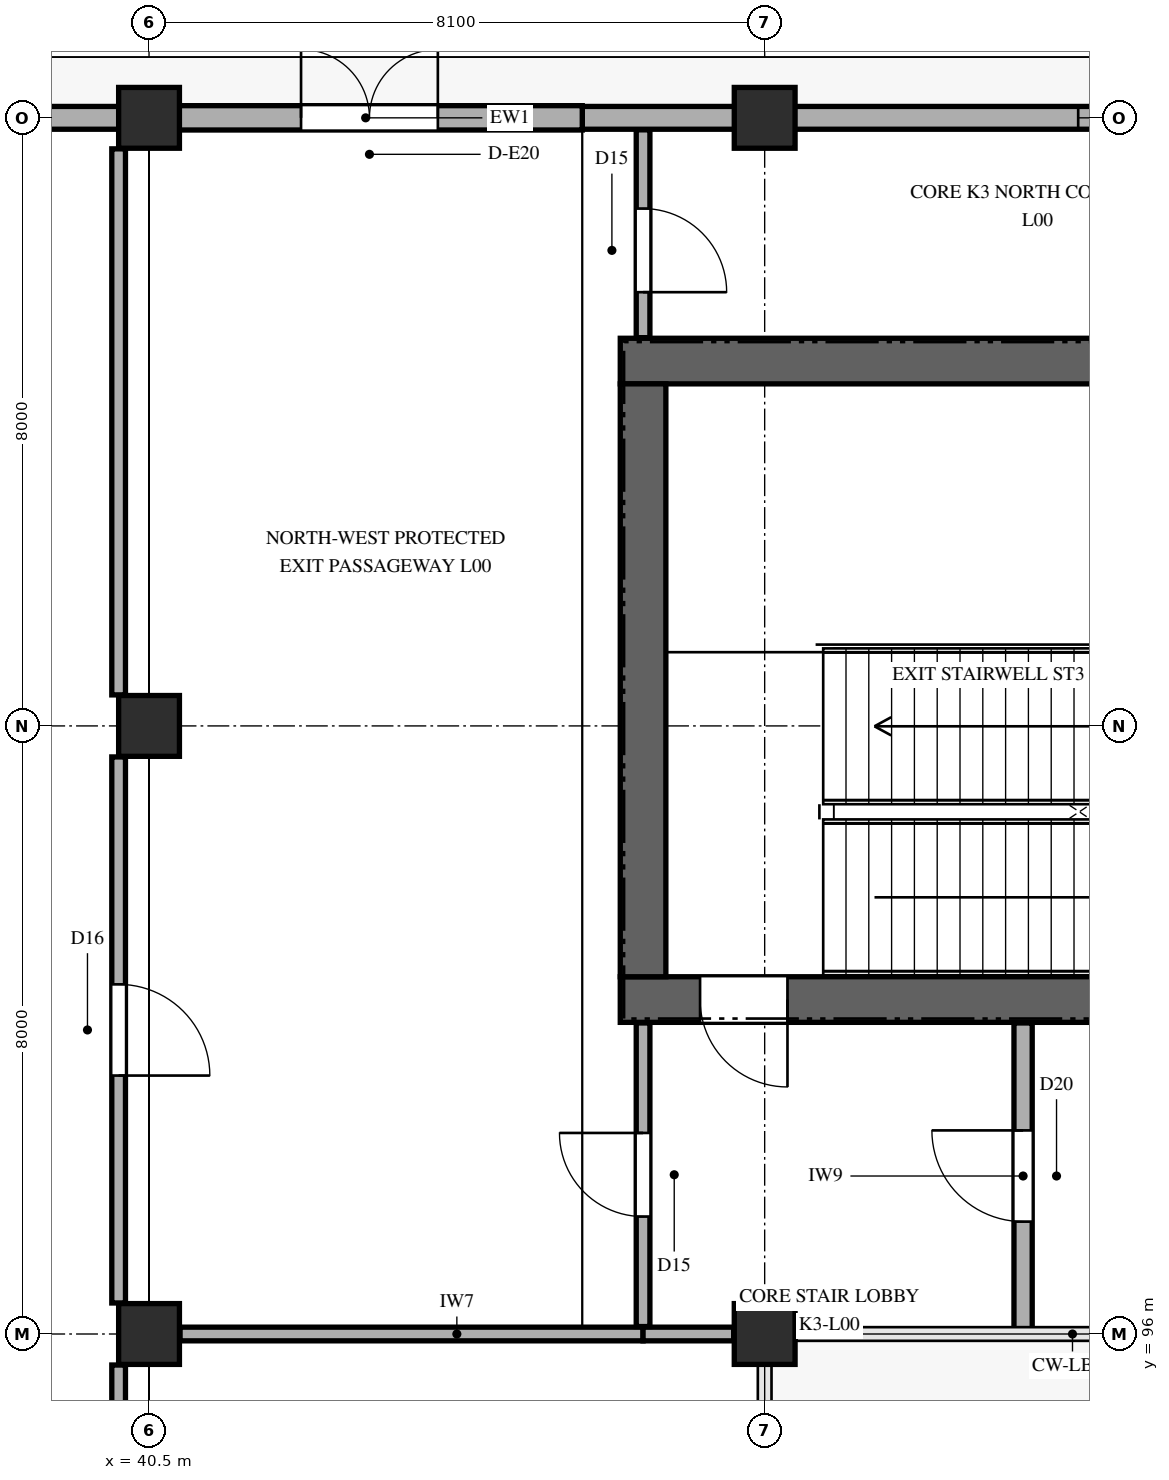
"""IFC4 building model, lengths in metres.
Left out: names, types, materials, properties, quantities, classifications, styles, units other than length and angle.
Written with IfcOpenShell. Run it as: python <this file> out.ifc"""

import sys

from ifc_helpers import new_model, si_unit, direction, frame, frame_2d, origin, origin_2d, place, context, subcontext, project, spatial, rectangle, extrude, element, fill, save


model = new_model("IFC4")
c1 = context("Model", 3, precision=1e-05, world=origin(), true_north=direction((0.0, 1.0)))
c2 = subcontext(c1, "Body", "Model", "MODEL_VIEW")
j1 = project(units=[si_unit("LENGTHUNIT", "METRE"), si_unit("PLANEANGLEUNIT", "RADIAN")], contexts=[c1])
p1 = place(None, origin())
s1 = spatial("IfcSite", under=j1, at=p1, CompositionType="ELEMENT")
p2 = place(p1, origin())
s2 = spatial("IfcBuilding", under=s1, at=p2, CompositionType="ELEMENT")
p3 = place(p2, origin())
s3 = spatial("IfcBuildingStorey", under=s2, at=p3, CompositionType="ELEMENT", Elevation=0.0)
p4 = place(p3, frame((46.7, 100.4, 0.0), z_axis=(0.0, 0.0, 1.0), x_axis=(1.0, 0.0, 0.0)))
e1 = element("IfcWall", 1, at=p4, inside=s3, PredefinedType="SHEAR", context=c2, shape_type="SweptSolid", body=[
    extrude(rectangle(XDim=15.4, YDim=0.6, at=frame_2d((7.7, 0.0))), origin(), (0.0, 0.0, 1.0), 5.4),
])
p5 = place(p4, frame((1.05, 0.0, 0.0)))
e2 = element("IfcOpeningElement", 2, at=p5, cuts=e1, PredefinedType="OPENING", context=c2, shape_type="SweptSolid", body=[
    extrude(rectangle(XDim=1.15, YDim=2.25, at=frame_2d((0.575, 1.125))), frame((0.0, 0.31, 0.0), z_axis=(0.0, -1.0, 0.0), x_axis=(1.0, 0.0, 0.0)), (0.0, 0.0, 1.0), 0.62),
])
p6 = place(p4, frame((10.333, 0.0, 0.0)))
e3 = element("IfcOpeningElement", 3, at=p6, cuts=e1, PredefinedType="OPENING", context=c2, shape_type="SweptSolid", body=[
    extrude(rectangle(XDim=1.1, YDim=2.2, at=frame_2d((0.55, 1.1))), frame((0.0, 0.31, 0.0), z_axis=(0.0, -1.0, 0.0), x_axis=(1.0, 0.0, 0.0)), (0.0, 0.0, 1.0), 0.62),
])
p7 = place(p4, frame((13.048, 0.0, 0.0)))
e4 = element("IfcOpeningElement", 4, at=p7, cuts=e1, PredefinedType="OPENING", context=c2, shape_type="SweptSolid", body=[
    extrude(rectangle(XDim=1.1, YDim=2.2, at=frame_2d((0.55, 1.1))), frame((0.0, 0.31, 0.0), z_axis=(0.0, -1.0, 0.0), x_axis=(1.0, 0.0, 0.0)), (0.0, 0.0, 1.0), 0.62),
])
p8 = place(p3, frame((46.7, 108.8, 0.0), z_axis=(0.0, 0.0, 1.0), x_axis=(1.0, 0.0, 0.0)))
e5 = element("IfcWall", 5, at=p8, inside=s3, PredefinedType="SHEAR", context=c2, shape_type="SweptSolid", body=[
    extrude(rectangle(XDim=15.4, YDim=0.6, at=frame_2d((7.7, 0.0))), origin(), (0.0, 0.0, 1.0), 5.4),
])
p9 = place(p3, frame((47.0, 100.7, 0.0), z_axis=(0.0, 0.0, 1.0), x_axis=(0.0, 1.0, 0.0)))
e6 = element("IfcWall", 6, at=p9, inside=s3, PredefinedType="SHEAR", context=c2, shape_type="SweptSolid", body=[
    extrude(rectangle(XDim=7.8, YDim=0.6, at=frame_2d((3.9, 0.0))), origin(), (0.0, 0.0, 1.0), 5.4),
])
for number, where, z_axis, x_axis in (
    (7, (40.5, 96.0, 0.0), (0.0, 0.0, 1.0), (1.0, 0.0, 0.0)),
    (8, (40.5, 104.0, 0.0), (0.0, 0.0, 1.0), (1.0, 0.0, 0.0)),
    (9, (40.5, 112.0, 0.0), (0.0, 0.0, 1.0), (1.0, 0.0, 0.0)),
    (10, (48.6, 96.0, 0.0), (0.0, 0.0, 1.0), (1.0, 0.0, 0.0)),
    (11, (48.6, 112.0, 0.0), (0.0, 0.0, 1.0), (1.0, 0.0, 0.0)),
):
    element("IfcColumn", number, at=place(p3, frame(where, z_axis=z_axis, x_axis=x_axis)), inside=s3, PredefinedType="COLUMN", context=c2, shape_type="SweptSolid", body=[
        extrude(rectangle(XDim=0.8, YDim=0.8, at=origin_2d()), origin(), (0.0, 0.0, 1.0), 5.4),
    ])
p10 = place(p3, frame((62.775, 112.0, 0.0), z_axis=(0.0, 0.0, 1.0), x_axis=(-1.0, 0.0, 0.0)))
e12 = element("IfcWall", 12, at=p10, inside=s3, PredefinedType="SOLIDWALL", context=c2, shape_type="SweptSolid", body=[
    extrude(rectangle(XDim=14.175, YDim=0.3, at=frame_2d((7.087, 0.0))), origin(), (0.0, 0.0, 1.0), 4.412),
])
p11 = place(p10, frame((8.55, 0.0, 0.95)))
e13 = element("IfcOpeningElement", 13, at=p11, cuts=e12, PredefinedType="OPENING", context=c2, shape_type="SweptSolid", body=[
    extrude(rectangle(XDim=1.5, YDim=1.8, at=frame_2d((0.75, 0.9))), frame((0.0, 0.16, 0.0), z_axis=(0.0, -1.0, 0.0), x_axis=(1.0, 0.0, 0.0)), (0.0, 0.0, 1.0), 0.32),
])
p12 = place(p3, frame((48.6, 112.0, 0.0), z_axis=(0.0, 0.0, 1.0), x_axis=(-1.0, 0.0, 0.0)))
e14 = element("IfcWall", 14, at=p12, inside=s3, PredefinedType="SOLIDWALL", context=c2, shape_type="SweptSolid", body=[
    extrude(rectangle(XDim=2.4, YDim=0.3, at=frame_2d((1.2, 0.0))), origin(), (0.0, 0.0, 1.0), 4.412),
])
p13 = place(p3, frame((46.2, 112.0, 0.0), z_axis=(0.0, 0.0, 1.0), x_axis=(-1.0, 0.0, 0.0)))
e15 = element("IfcWall", 15, at=p13, inside=s3, PredefinedType="SOLIDWALL", context=c2, shape_type="SweptSolid", body=[
    extrude(rectangle(XDim=5.7, YDim=0.32, at=frame_2d((2.85, 0.0))), origin(), (0.0, 0.0, 1.0), 4.412),
])
p14 = place(p13, frame((1.9, 0.0, 0.0)))
e16 = element("IfcOpeningElement", 16, at=p14, cuts=e15, PredefinedType="OPENING", context=c2, shape_type="SweptSolid", body=[
    extrude(rectangle(XDim=1.8, YDim=2.4, at=frame_2d((0.9, 1.2))), frame((0.0, 0.17, 0.0), z_axis=(0.0, -1.0, 0.0), x_axis=(1.0, 0.0, 0.0)), (0.0, 0.0, 1.0), 0.34),
])
p15 = place(p3, frame((40.5, 112.0, 0.0), z_axis=(0.0, 0.0, 1.0), x_axis=(-1.0, 0.0, 0.0)))
e17 = element("IfcWall", 17, at=p15, inside=s3, PredefinedType="SOLIDWALL", context=c2, shape_type="SweptSolid", body=[
    extrude(rectangle(XDim=12.15, YDim=0.3, at=frame_2d((6.075, 0.0))), origin(), (0.0, 0.0, 1.0), 4.412),
])
p16 = place(p3, frame((40.908, 96.0, 0.0), z_axis=(0.0, 0.0, 1.0), x_axis=(1.0, 0.0, 0.0)))
e18 = element("IfcWall", 18, at=p16, inside=s3, PredefinedType="PARTITIONING", context=c2, shape_type="SweptSolid", body=[
    extrude(rectangle(XDim=6.092, YDim=0.18, at=frame_2d((3.046, 0.0))), origin(), (0.0, 0.0, 1.0), 4.412),
])
p17 = place(p3, frame((47.0, 96.0, 0.0), z_axis=(0.0, 0.0, 1.0), x_axis=(1.0, 0.0, 0.0)))
e19 = element("IfcWall", 19, at=p17, inside=s3, PredefinedType="PARTITIONING", context=c2, shape_type="SweptSolid", body=[
    extrude(rectangle(XDim=1.192, YDim=0.18, at=frame_2d((0.596, 0.0))), origin(), (0.0, 0.0, 1.0), 4.412),
])
p18 = place(p3, frame((40.1, 88.408, 0.0), z_axis=(0.0, 0.0, 1.0), x_axis=(0.0, 1.0, 0.0)))
e20 = element("IfcWall", 20, at=p18, inside=s3, PredefinedType="PARTITIONING", context=c2, shape_type="SweptSolid", body=[
    extrude(rectangle(XDim=7.184, YDim=0.18, at=frame_2d((3.592, 0.0))), origin(), (0.0, 0.0, 1.0), 5.12),
])
p19 = place(p3, frame((40.1, 96.408, 0.0), z_axis=(0.0, 0.0, 1.0), x_axis=(0.0, 1.0, 0.0)))
e21 = element("IfcWall", 21, at=p19, inside=s3, PredefinedType="PARTITIONING", context=c2, shape_type="SweptSolid", body=[
    extrude(rectangle(XDim=7.184, YDim=0.18, at=frame_2d((3.592, 0.0))), origin(), (0.0, 0.0, 1.0), 5.12),
])
p20 = place(p19, frame((2.992, 0.0, 0.0)))
e22 = element("IfcOpeningElement", 22, at=p20, cuts=e21, PredefinedType="OPENING", context=c2, shape_type="SweptSolid", body=[
    extrude(rectangle(XDim=1.2, YDim=2.2, at=frame_2d((0.6, 1.1))), frame((0.0, 0.1, 0.0), z_axis=(0.0, -1.0, 0.0), x_axis=(1.0, 0.0, 0.0)), (0.0, 0.0, 1.0), 0.2),
])
p21 = place(p3, frame((40.1, 104.408, 0.0), z_axis=(0.0, 0.0, 1.0), x_axis=(0.0, 1.0, 0.0)))
e23 = element("IfcWall", 23, at=p21, inside=s3, PredefinedType="PARTITIONING", context=c2, shape_type="SweptSolid", body=[
    extrude(rectangle(XDim=7.184, YDim=0.18, at=frame_2d((3.592, 0.0))), origin(), (0.0, 0.0, 1.0), 5.12),
])
p22 = place(p3, frame((47.0, 96.098, 0.0), z_axis=(0.0, 0.0, 1.0), x_axis=(0.0, 1.0, 0.0)))
e24 = element("IfcWall", 24, at=p22, inside=s3, PredefinedType="PARTITIONING", context=c2, shape_type="SweptSolid", body=[
    extrude(rectangle(XDim=3.994, YDim=0.18, at=frame_2d((1.997, 0.0))), origin(), (0.0, 0.0, 1.0), 5.12),
])
p23 = place(p22, frame((1.447, 0.0, 0.0)))
e25 = element("IfcOpeningElement", 25, at=p23, cuts=e24, PredefinedType="OPENING", context=c2, shape_type="SweptSolid", body=[
    extrude(rectangle(XDim=1.1, YDim=2.2, at=frame_2d((0.55, 1.1))), frame((0.0, 0.1, 0.0), z_axis=(0.0, -1.0, 0.0), x_axis=(1.0, 0.0, 0.0)), (0.0, 0.0, 1.0), 0.2),
])
p24 = place(p3, frame((47.0, 109.108, 0.0), z_axis=(0.0, 0.0, 1.0), x_axis=(0.0, 1.0, 0.0)))
e26 = element("IfcWall", 26, at=p24, inside=s3, PredefinedType="PARTITIONING", context=c2, shape_type="SweptSolid", body=[
    extrude(rectangle(XDim=2.734, YDim=0.18, at=frame_2d((1.367, 0.0))), origin(), (0.0, 0.0, 1.0), 5.12),
])
p25 = place(p24, frame((0.598, 0.0, 0.0)))
e27 = element("IfcOpeningElement", 27, at=p25, cuts=e26, PredefinedType="OPENING", context=c2, shape_type="SweptSolid", body=[
    extrude(rectangle(XDim=1.1, YDim=2.2, at=frame_2d((0.55, 1.1))), frame((0.0, 0.1, 0.0), z_axis=(0.0, -1.0, 0.0), x_axis=(1.0, 0.0, 0.0)), (0.0, 0.0, 1.0), 0.2),
])
p26 = place(p3, frame((52.0, 96.065, 0.0), z_axis=(0.0, 0.0, 1.0), x_axis=(0.0, 1.0, 0.0)))
e28 = element("IfcWall", 28, at=p26, inside=s3, PredefinedType="PARTITIONING", context=c2, shape_type="SweptSolid", body=[
    extrude(rectangle(XDim=4.027, YDim=0.24, at=frame_2d((2.014, 0.0))), origin(), (0.0, 0.0, 1.0), 5.12),
])
p27 = place(p26, frame((1.414, 0.0, 0.0)))
e29 = element("IfcOpeningElement", 29, at=p27, cuts=e28, PredefinedType="OPENING", context=c2, shape_type="SweptSolid", body=[
    extrude(rectangle(XDim=1.2, YDim=2.3, at=frame_2d((0.6, 1.15))), frame((0.0, 0.13, 0.0), z_axis=(0.0, -1.0, 0.0), x_axis=(1.0, 0.0, 0.0)), (0.0, 0.0, 1.0), 0.26),
])
p28 = place(p11, origin())
e30 = element("IfcWindow", 30, at=p28, inside=s3, PartitioningType="DOUBLE_PANEL_VERTICAL", PredefinedType="WINDOW", context=c2, shape_type="SweptSolid", body=[
    extrude(rectangle(XDim=1.5, YDim=1.8, at=frame_2d((0.75, 0.9))), frame((0.0, 0.03, 0.0), z_axis=(0.0, -1.0, 0.0), x_axis=(1.0, 0.0, 0.0)), (0.0, 0.0, 1.0), 0.06),
])
fill(e13, e30)
p29 = place(p14, frame((1.8, 0.0, 0.0), z_axis=(0.0, 0.0, 1.0), x_axis=(-1.0, 0.0, 0.0)))
e31 = element("IfcDoor", 31, at=p29, inside=s3, OperationType="DOUBLE_DOOR_SINGLE_SWING", PredefinedType="DOOR", context=c2, shape_type="SweptSolid", body=[
    extrude(rectangle(XDim=1.8, YDim=2.4, at=frame_2d((0.9, 1.2))), frame((0.0, 0.025, 0.0), z_axis=(0.0, -1.0, 0.0), x_axis=(1.0, 0.0, 0.0)), (0.0, 0.0, 1.0), 0.05),
])
fill(e16, e31)
p30 = place(p5, frame((1.15, 0.0, 0.0), z_axis=(0.0, 0.0, 1.0), x_axis=(-1.0, 0.0, 0.0)))
e32 = element("IfcDoor", 32, at=p30, inside=s3, OperationType="SINGLE_SWING_RIGHT", PredefinedType="DOOR", context=c2, shape_type="SweptSolid", body=[
    extrude(rectangle(XDim=1.15, YDim=2.25, at=frame_2d((0.575, 1.125))), frame((0.0, 0.025, 0.0), z_axis=(0.0, -1.0, 0.0), x_axis=(1.0, 0.0, 0.0)), (0.0, 0.0, 1.0), 0.05),
])
fill(e2, e32)
p31 = place(p20, frame((1.2, 0.0, 0.0), z_axis=(0.0, 0.0, 1.0), x_axis=(-1.0, 0.0, 0.0)))
e33 = element("IfcDoor", 33, at=p31, inside=s3, OperationType="SINGLE_SWING_LEFT", PredefinedType="DOOR", context=c2, shape_type="SweptSolid", body=[
    extrude(rectangle(XDim=1.2, YDim=2.2, at=frame_2d((0.6, 1.1))), frame((0.0, 0.025, 0.0), z_axis=(0.0, -1.0, 0.0), x_axis=(1.0, 0.0, 0.0)), (0.0, 0.0, 1.0), 0.05),
])
fill(e22, e33)
p32 = place(p23, origin())
e34 = element("IfcDoor", 34, at=p32, inside=s3, OperationType="SINGLE_SWING_RIGHT", PredefinedType="DOOR", context=c2, shape_type="SweptSolid", body=[
    extrude(rectangle(XDim=1.1, YDim=2.2, at=frame_2d((0.55, 1.1))), frame((0.0, 0.025, 0.0), z_axis=(0.0, -1.0, 0.0), x_axis=(1.0, 0.0, 0.0)), (0.0, 0.0, 1.0), 0.05),
])
fill(e25, e34)
p33 = place(p25, frame((1.1, 0.0, 0.0), z_axis=(0.0, 0.0, 1.0), x_axis=(-1.0, 0.0, 0.0)))
e35 = element("IfcDoor", 35, at=p33, inside=s3, OperationType="SINGLE_SWING_LEFT", PredefinedType="DOOR", context=c2, shape_type="SweptSolid", body=[
    extrude(rectangle(XDim=1.1, YDim=2.2, at=frame_2d((0.55, 1.1))), frame((0.0, 0.025, 0.0), z_axis=(0.0, -1.0, 0.0), x_axis=(1.0, 0.0, 0.0)), (0.0, 0.0, 1.0), 0.05),
])
fill(e27, e35)
p34 = place(p27, origin())
e36 = element("IfcDoor", 36, at=p34, inside=s3, OperationType="SINGLE_SWING_RIGHT", PredefinedType="DOOR", context=c2, shape_type="SweptSolid", body=[
    extrude(rectangle(XDim=1.2, YDim=2.3, at=frame_2d((0.6, 1.15))), frame((0.0, 0.025, 0.0), z_axis=(0.0, -1.0, 0.0), x_axis=(1.0, 0.0, 0.0)), (0.0, 0.0, 1.0), 0.05),
])
fill(e29, e36)
save(model, sys.argv[1])
